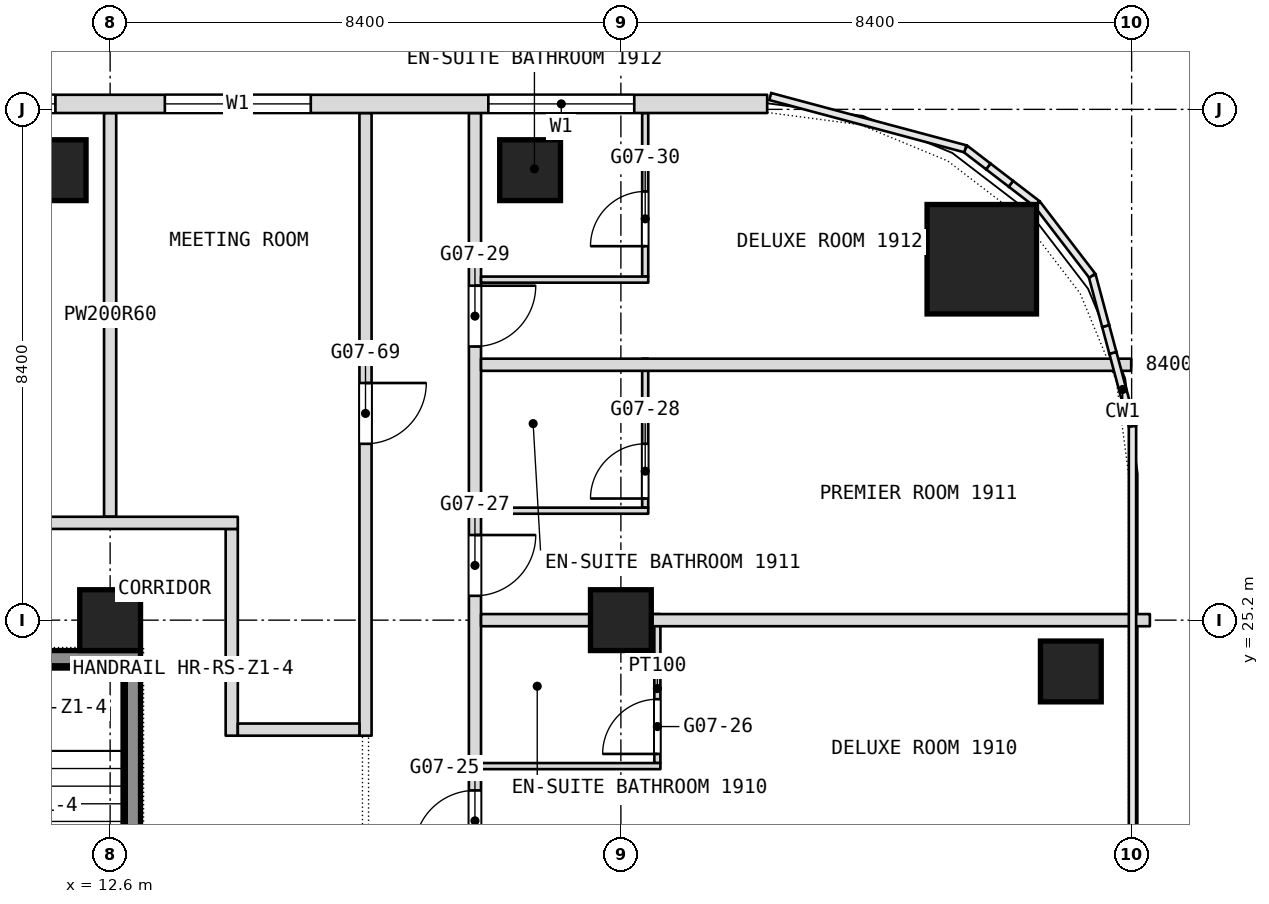
"""IFC4 building model, lengths in metres.
Left out: names, types, materials, properties, quantities, classifications, styles, units other than length and angle.
Written with IfcOpenShell. Run it as: python <this file> out.ifc"""

import sys

from ifc_helpers import new_model, si_unit, direction, frame, frame_2d, origin, origin_2d, place, context, subcontext, project, spatial, rectangle, extrude, element, fill, save


model = new_model("IFC4")
c1 = context("Model", 3, precision=1e-05, world=origin(), true_north=direction((0.0, 1.0)))
c2 = subcontext(c1, "Body", "Model", "MODEL_VIEW")
j1 = project(units=[si_unit("LENGTHUNIT", "METRE"), si_unit("PLANEANGLEUNIT", "RADIAN")], contexts=[c1])
p1 = place(None, origin())
s1 = spatial("IfcSite", under=j1, at=p1, CompositionType="ELEMENT")
p2 = place(p1, origin())
s2 = spatial("IfcBuilding", under=s1, at=p2, CompositionType="ELEMENT")
p3 = place(p2, frame((0.0, 0.0, 83.3)))
s3 = spatial("IfcBuildingStorey", under=s2, at=p3, CompositionType="ELEMENT", Elevation=83.3)
p4 = place(p3, frame((26.936, 31.135, 0.0), z_axis=(0.0, 0.0, 1.0), x_axis=(1.0, 0.0, 0.0)))
e1 = element("IfcColumn", 1, at=p4, inside=s3, PredefinedType="COLUMN", context=c2, shape_type="SweptSolid", body=[
    extrude(rectangle(XDim=1.8, YDim=1.8, at=origin_2d()), origin(), (0.0, 0.0, 1.0), 3.6),
])
for number, where, z_axis, x_axis in (
    (2, (12.6, 25.2, 0.0), (0.0, 0.0, 1.0), (1.0, 0.0, 0.0)),
    (3, (21.0, 25.2, 0.0), (0.0, 0.0, 1.0), (1.0, 0.0, 0.0)),
    (4, (11.704, 32.6, 0.0), (0.0, 0.0, 1.0), (1.0, 0.0, 0.0)),
    (5, (19.507, 32.6, 0.0), (0.0, 0.0, 1.0), (1.0, 0.0, 0.0)),
    (6, (28.4, 24.356, 0.0), (0.0, 0.0, 1.0), (1.0, 0.0, 0.0)),
):
    element("IfcColumn", number, at=place(p3, frame(where, z_axis=z_axis, x_axis=x_axis)), inside=s3, PredefinedType="COLUMN", context=c2, shape_type="SweptSolid", body=[
        extrude(rectangle(XDim=1.0, YDim=1.0, at=origin_2d()), origin(), (0.0, 0.0, 1.0), 3.6),
    ])
p5 = place(p3, frame((21.6, 22.85, 0.0), z_axis=(0.0, 0.0, 1.0), x_axis=(0.0, 1.0, 0.0)))
e7 = element("IfcWall", 7, at=p5, inside=s3, PredefinedType="PARTITIONING", context=c2, shape_type="SweptSolid", body=[
    extrude(rectangle(XDim=2.45, YDim=0.1, at=frame_2d((1.225, 0.0))), origin(), (0.0, 0.0, 1.0), 3.3),
])
p6 = place(p5, frame((0.15, 0.0, 0.0)))
e8 = element("IfcOpeningElement", 8, at=p6, cuts=e7, PredefinedType="OPENING", context=c2, shape_type="SweptSolid", body=[
    extrude(rectangle(XDim=0.9, YDim=2.1, at=frame_2d((0.45, 1.05))), frame((0.0, 0.05, 0.0), z_axis=(0.0, -1.0, 0.0), x_axis=(1.0, 0.0, 0.0)), (0.0, 0.0, 1.0), 0.1),
])
p7 = place(p3, frame((21.4, 27.05, 0.0), z_axis=(0.0, 0.0, 1.0), x_axis=(0.0, 1.0, 0.0)))
e9 = element("IfcWall", 9, at=p7, inside=s3, PredefinedType="PARTITIONING", context=c2, shape_type="SweptSolid", body=[
    extrude(rectangle(XDim=2.45, YDim=0.1, at=frame_2d((1.225, 0.0))), origin(), (0.0, 0.0, 1.0), 3.3),
])
p8 = place(p7, frame((0.15, 0.0, 0.0)))
e10 = element("IfcOpeningElement", 10, at=p8, cuts=e9, PredefinedType="OPENING", context=c2, shape_type="SweptSolid", body=[
    extrude(rectangle(XDim=0.9, YDim=2.1, at=frame_2d((0.45, 1.05))), frame((0.0, 0.05, 0.0), z_axis=(0.0, -1.0, 0.0), x_axis=(1.0, 0.0, 0.0)), (0.0, 0.0, 1.0), 0.1),
])
p9 = place(p3, frame((21.4, 30.85, 0.0), z_axis=(0.0, 0.0, 1.0), x_axis=(0.0, 1.0, 0.0)))
e11 = element("IfcWall", 11, at=p9, inside=s3, PredefinedType="PARTITIONING", context=c2, shape_type="SweptSolid", body=[
    extrude(rectangle(XDim=2.69, YDim=0.1, at=frame_2d((1.345, 0.0))), origin(), (0.0, 0.0, 1.0), 3.3),
])
p10 = place(p9, frame((0.5, 0.0, 0.0)))
e12 = element("IfcOpeningElement", 12, at=p10, cuts=e11, PredefinedType="OPENING", context=c2, shape_type="SweptSolid", body=[
    extrude(rectangle(XDim=0.9, YDim=2.1, at=frame_2d((0.45, 1.05))), frame((0.0, 0.05, 0.0), z_axis=(0.0, -1.0, 0.0), x_axis=(1.0, 0.0, 0.0)), (0.0, 0.0, 1.0), 0.1),
])
p11 = place(p3, frame((18.6, -16.665, 0.0), z_axis=(0.0, 0.0, 1.0), x_axis=(0.0, 1.0, 0.0)))
e13 = element("IfcWall", 13, at=p11, inside=s3, PredefinedType="PARTITIONING", context=c2, shape_type="SweptSolid", body=[
    extrude(rectangle(XDim=50.205, YDim=0.2, at=frame_2d((25.103, 0.0))), origin(), (0.0, 0.0, 1.0), 3.3),
])
p12 = place(p11, frame((2.991, 0.0, 0.0)))
e14 = element("IfcOpeningElement", 14, at=p12, cuts=e13, PredefinedType="OPENING", context=c2, shape_type="SweptSolid", body=[
    extrude(rectangle(XDim=1.0, YDim=2.1, at=frame_2d((0.5, 1.05))), frame((0.0, 0.1, 0.0), z_axis=(0.0, -1.0, 0.0), x_axis=(1.0, 0.0, 0.0)), (0.0, 0.0, 1.0), 0.2),
])
p13 = place(p11, frame((4.574, 0.0, 0.0)))
e15 = element("IfcOpeningElement", 15, at=p13, cuts=e13, PredefinedType="OPENING", context=c2, shape_type="SweptSolid", body=[
    extrude(rectangle(XDim=1.0, YDim=2.1, at=frame_2d((0.5, 1.05))), frame((0.0, 0.1, 0.0), z_axis=(0.0, -1.0, 0.0), x_axis=(1.0, 0.0, 0.0)), (0.0, 0.0, 1.0), 0.2),
])
p14 = place(p11, frame((8.665, 0.0, 0.0)))
e16 = element("IfcOpeningElement", 16, at=p14, cuts=e13, PredefinedType="OPENING", context=c2, shape_type="SweptSolid", body=[
    extrude(rectangle(XDim=1.0, YDim=2.1, at=frame_2d((0.5, 1.05))), frame((0.0, 0.1, 0.0), z_axis=(0.0, -1.0, 0.0), x_axis=(1.0, 0.0, 0.0)), (0.0, 0.0, 1.0), 0.2),
])
p15 = place(p11, frame((15.265, 0.0, 0.0)))
e17 = element("IfcOpeningElement", 17, at=p15, cuts=e13, PredefinedType="OPENING", context=c2, shape_type="SweptSolid", body=[
    extrude(rectangle(XDim=1.0, YDim=2.1, at=frame_2d((0.5, 1.05))), frame((0.0, 0.1, 0.0), z_axis=(0.0, -1.0, 0.0), x_axis=(1.0, 0.0, 0.0)), (0.0, 0.0, 1.0), 0.2),
])
p16 = place(p11, frame((19.465, 0.0, 0.0)))
e18 = element("IfcOpeningElement", 18, at=p16, cuts=e13, PredefinedType="OPENING", context=c2, shape_type="SweptSolid", body=[
    extrude(rectangle(XDim=1.0, YDim=2.1, at=frame_2d((0.5, 1.05))), frame((0.0, 0.1, 0.0), z_axis=(0.0, -1.0, 0.0), x_axis=(1.0, 0.0, 0.0)), (0.0, 0.0, 1.0), 0.2),
])
p17 = place(p11, frame((21.265, 0.0, 0.0)))
e19 = element("IfcOpeningElement", 19, at=p17, cuts=e13, PredefinedType="OPENING", context=c2, shape_type="SweptSolid", body=[
    extrude(rectangle(XDim=1.0, YDim=2.1, at=frame_2d((0.5, 1.05))), frame((0.0, 0.1, 0.0), z_axis=(0.0, -1.0, 0.0), x_axis=(1.0, 0.0, 0.0)), (0.0, 0.0, 1.0), 0.2),
])
p18 = place(p11, frame((25.465, 0.0, 0.0)))
e20 = element("IfcOpeningElement", 20, at=p18, cuts=e13, PredefinedType="OPENING", context=c2, shape_type="SweptSolid", body=[
    extrude(rectangle(XDim=1.0, YDim=2.1, at=frame_2d((0.5, 1.05))), frame((0.0, 0.1, 0.0), z_axis=(0.0, -1.0, 0.0), x_axis=(1.0, 0.0, 0.0)), (0.0, 0.0, 1.0), 0.2),
])
p19 = place(p11, frame((32.065, 0.0, 0.0)))
e21 = element("IfcOpeningElement", 21, at=p19, cuts=e13, PredefinedType="OPENING", context=c2, shape_type="SweptSolid", body=[
    extrude(rectangle(XDim=1.0, YDim=2.1, at=frame_2d((0.5, 1.05))), frame((0.0, 0.1, 0.0), z_axis=(0.0, -1.0, 0.0), x_axis=(1.0, 0.0, 0.0)), (0.0, 0.0, 1.0), 0.2),
])
p20 = place(p11, frame((36.265, 0.0, 0.0)))
e22 = element("IfcOpeningElement", 22, at=p20, cuts=e13, PredefinedType="OPENING", context=c2, shape_type="SweptSolid", body=[
    extrude(rectangle(XDim=1.0, YDim=2.1, at=frame_2d((0.5, 1.05))), frame((0.0, 0.1, 0.0), z_axis=(0.0, -1.0, 0.0), x_axis=(1.0, 0.0, 0.0)), (0.0, 0.0, 1.0), 0.2),
])
p21 = place(p11, frame((38.065, 0.0, 0.0)))
e23 = element("IfcOpeningElement", 23, at=p21, cuts=e13, PredefinedType="OPENING", context=c2, shape_type="SweptSolid", body=[
    extrude(rectangle(XDim=1.0, YDim=2.1, at=frame_2d((0.5, 1.05))), frame((0.0, 0.1, 0.0), z_axis=(0.0, -1.0, 0.0), x_axis=(1.0, 0.0, 0.0)), (0.0, 0.0, 1.0), 0.2),
])
p22 = place(p11, frame((42.265, 0.0, 0.0)))
e24 = element("IfcOpeningElement", 24, at=p22, cuts=e13, PredefinedType="OPENING", context=c2, shape_type="SweptSolid", body=[
    extrude(rectangle(XDim=1.0, YDim=2.1, at=frame_2d((0.5, 1.05))), frame((0.0, 0.1, 0.0), z_axis=(0.0, -1.0, 0.0), x_axis=(1.0, 0.0, 0.0)), (0.0, 0.0, 1.0), 0.2),
])
p23 = place(p11, frame((46.365, 0.0, 0.0)))
e25 = element("IfcOpeningElement", 25, at=p23, cuts=e13, PredefinedType="OPENING", context=c2, shape_type="SweptSolid", body=[
    extrude(rectangle(XDim=1.0, YDim=2.1, at=frame_2d((0.5, 1.05))), frame((0.0, 0.1, 0.0), z_axis=(0.0, -1.0, 0.0), x_axis=(1.0, 0.0, 0.0)), (0.0, 0.0, 1.0), 0.2),
])
p24 = place(p3, frame((16.8, 23.3, 0.0), z_axis=(0.0, 0.0, 1.0), x_axis=(0.0, 1.0, 0.0)))
e26 = element("IfcWall", 26, at=p24, inside=s3, PredefinedType="PARTITIONING", context=c2, shape_type="SweptSolid", body=[
    extrude(rectangle(XDim=10.24, YDim=0.2, at=frame_2d((5.12, 0.0))), origin(), (0.0, 0.0, 1.0), 3.3),
])
p25 = place(p24, frame((4.8, 0.0, 0.0)))
e27 = element("IfcOpeningElement", 27, at=p25, cuts=e26, PredefinedType="OPENING", context=c2, shape_type="SweptSolid", body=[
    extrude(rectangle(XDim=1.0, YDim=2.1, at=frame_2d((0.5, 1.05))), frame((0.0, 0.1, 0.0), z_axis=(0.0, -1.0, 0.0), x_axis=(1.0, 0.0, 0.0)), (0.0, 0.0, 1.0), 0.2),
])
p26 = place(p3, frame((14.6, 23.3, 0.0), z_axis=(0.0, 0.0, 1.0), x_axis=(0.0, 1.0, 0.0)))
e28 = element("IfcWall", 28, at=p26, inside=s3, PredefinedType="PARTITIONING", context=c2, shape_type="SweptSolid", body=[
    extrude(rectangle(XDim=3.4, YDim=0.2, at=frame_2d((1.7, 0.0))), origin(), (0.0, 0.0, 1.0), 3.3),
])
p27 = place(p3, frame((12.6, 26.9, 0.0), z_axis=(0.0, 0.0, 1.0), x_axis=(0.0, 1.0, 0.0)))
e29 = element("IfcWall", 29, at=p27, inside=s3, PredefinedType="PARTITIONING", context=c2, shape_type="SweptSolid", body=[
    extrude(rectangle(XDim=6.64, YDim=0.2, at=frame_2d((3.32, 0.0))), origin(), (0.0, 0.0, 1.0), 3.3),
])
p28 = place(p3, frame((18.7, 22.8, 0.0), z_axis=(0.0, 0.0, 1.0), x_axis=(1.0, 0.0, 0.0)))
e30 = element("IfcWall", 30, at=p28, inside=s3, PredefinedType="PARTITIONING", context=c2, shape_type="SweptSolid", body=[
    extrude(rectangle(XDim=2.95, YDim=0.1, at=frame_2d((1.475, 0.0))), origin(), (0.0, 0.0, 1.0), 3.3),
])
p29 = place(p3, frame((14.7, 23.4, 0.0), z_axis=(0.0, 0.0, 1.0), x_axis=(1.0, 0.0, 0.0)))
e31 = element("IfcWall", 31, at=p29, inside=s3, PredefinedType="PARTITIONING", context=c2, shape_type="SweptSolid", body=[
    extrude(rectangle(XDim=2.0, YDim=0.2, at=frame_2d((1.0, 0.0))), origin(), (0.0, 0.0, 1.0), 3.3),
])
p30 = place(p3, frame((18.7, 25.2, 0.0), z_axis=(0.0, 0.0, 1.0), x_axis=(1.0, 0.0, 0.0)))
e32 = element("IfcWall", 32, at=p30, inside=s3, PredefinedType="PARTITIONING", context=c2, shape_type="SweptSolid", body=[
    extrude(rectangle(XDim=11.0, YDim=0.2, at=frame_2d((5.5, 0.0))), origin(), (0.0, 0.0, 1.0), 2.8),
])
p31 = place(p3, frame((6.7, 26.8, 0.0), z_axis=(0.0, 0.0, 1.0), x_axis=(1.0, 0.0, 0.0)))
e33 = element("IfcWall", 33, at=p31, inside=s3, PredefinedType="PARTITIONING", context=c2, shape_type="SweptSolid", body=[
    extrude(rectangle(XDim=8.0, YDim=0.2, at=frame_2d((4.0, 0.0))), origin(), (0.0, 0.0, 1.0), 3.3),
])
p32 = place(p3, frame((18.7, 27.0, 0.0), z_axis=(0.0, 0.0, 1.0), x_axis=(1.0, 0.0, 0.0)))
e34 = element("IfcWall", 34, at=p32, inside=s3, PredefinedType="PARTITIONING", context=c2, shape_type="SweptSolid", body=[
    extrude(rectangle(XDim=2.75, YDim=0.1, at=frame_2d((1.375, 0.0))), origin(), (0.0, 0.0, 1.0), 3.3),
])
p33 = place(p3, frame((18.7, 29.4, 0.0), z_axis=(0.0, 0.0, 1.0), x_axis=(1.0, 0.0, 0.0)))
e35 = element("IfcWall", 35, at=p33, inside=s3, PredefinedType="PARTITIONING", context=c2, shape_type="SweptSolid", body=[
    extrude(rectangle(XDim=10.693, YDim=0.2, at=frame_2d((5.347, 0.0))), origin(), (0.0, 0.0, 1.0), 3.3),
])
p34 = place(p3, frame((18.7, 30.8, 0.0), z_axis=(0.0, 0.0, 1.0), x_axis=(1.0, 0.0, 0.0)))
e36 = element("IfcWall", 36, at=p34, inside=s3, PredefinedType="PARTITIONING", context=c2, shape_type="SweptSolid", body=[
    extrude(rectangle(XDim=2.75, YDim=0.1, at=frame_2d((1.375, 0.0))), origin(), (0.0, 0.0, 1.0), 3.3),
])
p35 = place(p3, frame((23.406, 33.69, 0.0), z_axis=(0.0, 0.0, 1.0), x_axis=(-1.0, 0.0, 0.0)))
e37 = element("IfcWall", 37, at=p35, inside=s3, PredefinedType="NOTDEFINED", context=c2, shape_type="SweptSolid", body=[
    extrude(rectangle(XDim=46.812, YDim=0.3, at=frame_2d((23.406, 0.0))), origin(), (0.0, 0.0, 1.0), 3.6),
])
p36 = place(p35, frame((2.186, 0.0, 0.9)))
e38 = element("IfcOpeningElement", 38, at=p36, cuts=e37, PredefinedType="OPENING", context=c2, shape_type="SweptSolid", body=[
    extrude(rectangle(XDim=2.4, YDim=2.1, at=frame_2d((1.2, 1.05))), frame((0.0, 0.15, 0.0), z_axis=(0.0, -1.0, 0.0), x_axis=(1.0, 0.0, 0.0)), (0.0, 0.0, 1.0), 0.3),
])
p37 = place(p35, frame((7.506, 0.0, 0.9)))
e39 = element("IfcOpeningElement", 39, at=p37, cuts=e37, PredefinedType="OPENING", context=c2, shape_type="SweptSolid", body=[
    extrude(rectangle(XDim=2.4, YDim=2.1, at=frame_2d((1.2, 1.05))), frame((0.0, 0.15, 0.0), z_axis=(0.0, -1.0, 0.0), x_axis=(1.0, 0.0, 0.0)), (0.0, 0.0, 1.0), 0.3),
])
p38 = place(p35, frame((11.706, 0.0, 0.9)))
e40 = element("IfcOpeningElement", 40, at=p38, cuts=e37, PredefinedType="OPENING", context=c2, shape_type="SweptSolid", body=[
    extrude(rectangle(XDim=2.4, YDim=2.1, at=frame_2d((1.2, 1.05))), frame((0.0, 0.15, 0.0), z_axis=(0.0, -1.0, 0.0), x_axis=(1.0, 0.0, 0.0)), (0.0, 0.0, 1.0), 0.3),
])
p39 = place(p35, frame((15.906, 0.0, 0.9)))
e41 = element("IfcOpeningElement", 41, at=p39, cuts=e37, PredefinedType="OPENING", context=c2, shape_type="SweptSolid", body=[
    extrude(rectangle(XDim=2.4, YDim=2.1, at=frame_2d((1.2, 1.05))), frame((0.0, 0.15, 0.0), z_axis=(0.0, -1.0, 0.0), x_axis=(1.0, 0.0, 0.0)), (0.0, 0.0, 1.0), 0.3),
])
p40 = place(p35, frame((20.106, 0.0, 0.9)))
e42 = element("IfcOpeningElement", 42, at=p40, cuts=e37, PredefinedType="OPENING", context=c2, shape_type="SweptSolid", body=[
    extrude(rectangle(XDim=2.4, YDim=2.1, at=frame_2d((1.2, 1.05))), frame((0.0, 0.15, 0.0), z_axis=(0.0, -1.0, 0.0), x_axis=(1.0, 0.0, 0.0)), (0.0, 0.0, 1.0), 0.3),
])
p41 = place(p35, frame((24.306, 0.0, 0.9)))
e43 = element("IfcOpeningElement", 43, at=p41, cuts=e37, PredefinedType="OPENING", context=c2, shape_type="SweptSolid", body=[
    extrude(rectangle(XDim=2.4, YDim=2.1, at=frame_2d((1.2, 1.05))), frame((0.0, 0.15, 0.0), z_axis=(0.0, -1.0, 0.0), x_axis=(1.0, 0.0, 0.0)), (0.0, 0.0, 1.0), 0.3),
])
p42 = place(p35, frame((28.506, 0.0, 0.9)))
e44 = element("IfcOpeningElement", 44, at=p42, cuts=e37, PredefinedType="OPENING", context=c2, shape_type="SweptSolid", body=[
    extrude(rectangle(XDim=2.4, YDim=2.1, at=frame_2d((1.2, 1.05))), frame((0.0, 0.15, 0.0), z_axis=(0.0, -1.0, 0.0), x_axis=(1.0, 0.0, 0.0)), (0.0, 0.0, 1.0), 0.3),
])
p43 = place(p35, frame((32.706, 0.0, 0.9)))
e45 = element("IfcOpeningElement", 45, at=p43, cuts=e37, PredefinedType="OPENING", context=c2, shape_type="SweptSolid", body=[
    extrude(rectangle(XDim=2.4, YDim=2.1, at=frame_2d((1.2, 1.05))), frame((0.0, 0.15, 0.0), z_axis=(0.0, -1.0, 0.0), x_axis=(1.0, 0.0, 0.0)), (0.0, 0.0, 1.0), 0.3),
])
p44 = place(p35, frame((36.906, 0.0, 0.9)))
e46 = element("IfcOpeningElement", 46, at=p44, cuts=e37, PredefinedType="OPENING", context=c2, shape_type="SweptSolid", body=[
    extrude(rectangle(XDim=2.4, YDim=2.1, at=frame_2d((1.2, 1.05))), frame((0.0, 0.15, 0.0), z_axis=(0.0, -1.0, 0.0), x_axis=(1.0, 0.0, 0.0)), (0.0, 0.0, 1.0), 0.3),
])
p45 = place(p35, frame((42.226, 0.0, 0.9)))
e47 = element("IfcOpeningElement", 47, at=p45, cuts=e37, PredefinedType="OPENING", context=c2, shape_type="SweptSolid", body=[
    extrude(rectangle(XDim=2.4, YDim=2.1, at=frame_2d((1.2, 1.05))), frame((0.0, 0.15, 0.0), z_axis=(0.0, -1.0, 0.0), x_axis=(1.0, 0.0, 0.0)), (0.0, 0.0, 1.0), 0.3),
])
p46 = place(p3, frame((9.7, 24.575, 0.1), z_axis=(0.0, 0.0, 1.0), x_axis=(1.0, 0.0, 0.0)))
e48 = element("IfcWall", 48, at=p46, inside=s3, PredefinedType="SHEAR", context=c2, shape_type="SweptSolid", body=[
    extrude(rectangle(XDim=3.4, YDim=0.25, at=frame_2d((1.7, 0.0))), origin(), (0.0, 0.0, 1.0), 3.6),
])
p47 = place(p3, frame((12.975, 18.75, 0.1), z_axis=(0.0, 0.0, 1.0), x_axis=(0.0, 1.0, 0.0)))
e49 = element("IfcWall", 49, at=p47, inside=s3, PredefinedType="SHEAR", context=c2, shape_type="SweptSolid", body=[
    extrude(rectangle(XDim=5.7, YDim=0.25, at=frame_2d((2.85, 0.0))), origin(), (0.0, 0.0, 1.0), 3.6),
])
p48 = place(p6, origin())
e50 = element("IfcDoor", 50, at=p48, inside=s3, OperationType="SINGLE_SWING_LEFT", PredefinedType="DOOR", context=c2, shape_type="SweptSolid", body=[
    extrude(rectangle(XDim=0.9, YDim=2.1, at=frame_2d((0.45, 1.05))), frame((0.0, 0.025, 0.0), z_axis=(0.0, -1.0, 0.0), x_axis=(1.0, 0.0, 0.0)), (0.0, 0.0, 1.0), 0.05),
])
fill(e8, e50)
p49 = place(p8, origin())
e51 = element("IfcDoor", 51, at=p49, inside=s3, OperationType="SINGLE_SWING_LEFT", PredefinedType="DOOR", context=c2, shape_type="SweptSolid", body=[
    extrude(rectangle(XDim=0.9, YDim=2.1, at=frame_2d((0.45, 1.05))), frame((0.0, 0.025, 0.0), z_axis=(0.0, -1.0, 0.0), x_axis=(1.0, 0.0, 0.0)), (0.0, 0.0, 1.0), 0.05),
])
fill(e10, e51)
p50 = place(p10, origin())
e52 = element("IfcDoor", 52, at=p50, inside=s3, OperationType="SINGLE_SWING_LEFT", PredefinedType="DOOR", context=c2, shape_type="SweptSolid", body=[
    extrude(rectangle(XDim=0.9, YDim=2.1, at=frame_2d((0.45, 1.05))), frame((0.0, 0.025, 0.0), z_axis=(0.0, -1.0, 0.0), x_axis=(1.0, 0.0, 0.0)), (0.0, 0.0, 1.0), 0.05),
])
fill(e12, e52)
p51 = place(p21, origin())
e53 = element("IfcDoor", 53, at=p51, inside=s3, OperationType="SINGLE_SWING_LEFT", PredefinedType="DOOR", context=c2, shape_type="SweptSolid", body=[
    extrude(rectangle(XDim=1.0, YDim=2.1, at=frame_2d((0.5, 1.05))), frame((0.0, 0.025, 0.0), z_axis=(0.0, -1.0, 0.0), x_axis=(1.0, 0.0, 0.0)), (0.0, 0.0, 1.0), 0.05),
])
fill(e23, e53)
p52 = place(p22, origin())
e54 = element("IfcDoor", 54, at=p52, inside=s3, OperationType="SINGLE_SWING_LEFT", PredefinedType="DOOR", context=c2, shape_type="SweptSolid", body=[
    extrude(rectangle(XDim=1.0, YDim=2.1, at=frame_2d((0.5, 1.05))), frame((0.0, 0.025, 0.0), z_axis=(0.0, -1.0, 0.0), x_axis=(1.0, 0.0, 0.0)), (0.0, 0.0, 1.0), 0.05),
])
fill(e24, e54)
p53 = place(p23, origin())
e55 = element("IfcDoor", 55, at=p53, inside=s3, OperationType="SINGLE_SWING_LEFT", PredefinedType="DOOR", context=c2, shape_type="SweptSolid", body=[
    extrude(rectangle(XDim=1.0, YDim=2.1, at=frame_2d((0.5, 1.05))), frame((0.0, 0.025, 0.0), z_axis=(0.0, -1.0, 0.0), x_axis=(1.0, 0.0, 0.0)), (0.0, 0.0, 1.0), 0.05),
])
fill(e25, e55)
p54 = place(p25, origin())
e56 = element("IfcDoor", 56, at=p54, inside=s3, OperationType="SINGLE_SWING_LEFT", PredefinedType="DOOR", context=c2, shape_type="SweptSolid", body=[
    extrude(rectangle(XDim=1.0, YDim=2.1, at=frame_2d((0.5, 1.05))), frame((0.0, 0.025, 0.0), z_axis=(0.0, -1.0, 0.0), x_axis=(1.0, 0.0, 0.0)), (0.0, 0.0, 1.0), 0.05),
])
fill(e27, e56)
p55 = place(p36, origin())
e57 = element("IfcWindow", 57, at=p55, inside=s3, PartitioningType="SINGLE_PANEL", PredefinedType="WINDOW", context=c2, shape_type="SweptSolid", body=[
    extrude(rectangle(XDim=2.4, YDim=2.1, at=frame_2d((1.2, 1.05))), frame((0.0, 0.03, 0.0), z_axis=(0.0, -1.0, 0.0), x_axis=(1.0, 0.0, 0.0)), (0.0, 0.0, 1.0), 0.06),
])
fill(e38, e57)
p56 = place(p37, origin())
e58 = element("IfcWindow", 58, at=p56, inside=s3, PartitioningType="SINGLE_PANEL", PredefinedType="WINDOW", context=c2, shape_type="SweptSolid", body=[
    extrude(rectangle(XDim=2.4, YDim=2.1, at=frame_2d((1.2, 1.05))), frame((0.0, 0.03, 0.0), z_axis=(0.0, -1.0, 0.0), x_axis=(1.0, 0.0, 0.0)), (0.0, 0.0, 1.0), 0.06),
])
fill(e39, e58)
p57 = place(p38, origin())
e59 = element("IfcWindow", 59, at=p57, inside=s3, PartitioningType="SINGLE_PANEL", PredefinedType="WINDOW", context=c2, shape_type="SweptSolid", body=[
    extrude(rectangle(XDim=2.4, YDim=2.1, at=frame_2d((1.2, 1.05))), frame((0.0, 0.03, 0.0), z_axis=(0.0, -1.0, 0.0), x_axis=(1.0, 0.0, 0.0)), (0.0, 0.0, 1.0), 0.06),
])
fill(e40, e59)
save(model, sys.argv[1])
